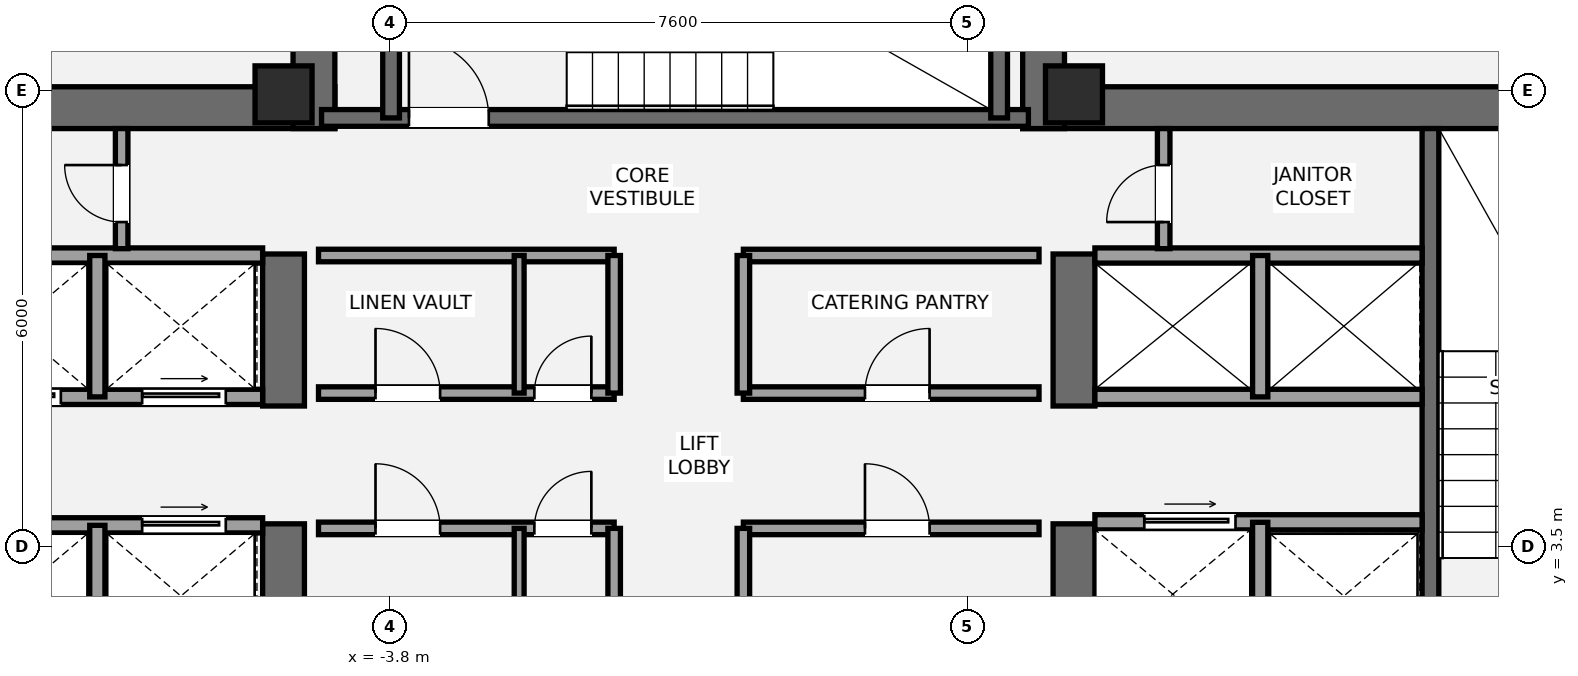
"""IFC4 building model, lengths in metres.
Left out: names, types, materials, properties, quantities, classifications, styles, units other than length and angle.
Written with IfcOpenShell. Run it as: python <this file> out.ifc"""

import sys

from ifc_helpers import new_model, si_unit, direction, frame, frame_2d, origin, origin_2d, place, context, subcontext, project, spatial, rectangle, extrude, element, fill, save


model = new_model("IFC4")
c1 = context("Model", 3, precision=1e-05, world=origin(), true_north=direction((0.0, 1.0)))
c2 = subcontext(c1, "Body", "Model", "MODEL_VIEW")
j1 = project(units=[si_unit("LENGTHUNIT", "METRE"), si_unit("PLANEANGLEUNIT", "RADIAN")], contexts=[c1])
p1 = place(None, origin())
s1 = spatial("IfcSite", under=j1, at=p1, CompositionType="ELEMENT")
p2 = place(p1, origin())
s2 = spatial("IfcBuilding", under=s1, at=p2, CompositionType="ELEMENT")
p3 = place(p2, frame((0.0, 0.0, 210.0)))
s3 = spatial("IfcBuildingStorey", under=s2, at=p3, CompositionType="ELEMENT", Elevation=210.0)
p4 = place(p3, frame((-13.7, 9.275, 0.0), z_axis=(0.0, 0.0, 1.0), x_axis=(1.0, 0.0, 0.0)))
e1 = element("IfcWall", 1, at=p4, inside=s3, PredefinedType="SHEAR", context=c2, shape_type="SweptSolid", body=[
    extrude(rectangle(XDim=9.175, YDim=0.55, at=frame_2d((4.587, 0.0))), origin(), (0.0, 0.0, 1.0), 3.15),
])
p5 = place(p3, frame((-5.2, 1.3, 0.0), z_axis=(0.0, 0.0, 1.0), x_axis=(0.0, 1.0, 0.0)))
e2 = element("IfcWall", 2, at=p5, inside=s3, PredefinedType="SHEAR", context=c2, shape_type="SweptSolid", body=[
    extrude(rectangle(XDim=2.5, YDim=0.55, at=frame_2d((1.25, 0.0))), origin(), (0.0, 0.0, 1.0), 3.15),
])
p6 = place(p3, frame((-5.2, 5.35, 0.0), z_axis=(0.0, 0.0, 1.0), x_axis=(0.0, 1.0, 0.0)))
e3 = element("IfcWall", 3, at=p6, inside=s3, PredefinedType="SHEAR", context=c2, shape_type="SweptSolid", body=[
    extrude(rectangle(XDim=2.0, YDim=0.55, at=frame_2d((1.0, 0.0))), origin(), (0.0, 0.0, 1.0), 3.15),
])
p7 = place(p3, frame((4.525, 9.275, 0.0), z_axis=(0.0, 0.0, 1.0), x_axis=(1.0, 0.0, 0.0)))
e4 = element("IfcWall", 4, at=p7, inside=s3, PredefinedType="SHEAR", context=c2, shape_type="SweptSolid", body=[
    extrude(rectangle(XDim=9.175, YDim=0.55, at=frame_2d((4.587, 0.0))), origin(), (0.0, 0.0, 1.0), 3.15),
])
p8 = place(p3, frame((5.2, 1.3, 0.0), z_axis=(0.0, 0.0, 1.0), x_axis=(0.0, 1.0, 0.0)))
e5 = element("IfcWall", 5, at=p8, inside=s3, PredefinedType="SHEAR", context=c2, shape_type="SweptSolid", body=[
    extrude(rectangle(XDim=2.5, YDim=0.55, at=frame_2d((1.25, 0.0))), origin(), (0.0, 0.0, 1.0), 3.15),
])
p9 = place(p3, frame((5.2, 5.35, 0.0), z_axis=(0.0, 0.0, 1.0), x_axis=(0.0, 1.0, 0.0)))
e6 = element("IfcWall", 6, at=p9, inside=s3, PredefinedType="SHEAR", context=c2, shape_type="SweptSolid", body=[
    extrude(rectangle(XDim=2.0, YDim=0.55, at=frame_2d((1.0, 0.0))), origin(), (0.0, 0.0, 1.0), 3.15),
])
p10 = place(p3, frame((9.89, 1.85, 0.0), z_axis=(0.0, 0.0, 1.0), x_axis=(0.0, 1.0, 0.0)))
e7 = element("IfcWall", 7, at=p10, inside=s3, PredefinedType="SHEAR", context=c2, shape_type="SweptSolid", body=[
    extrude(rectangle(XDim=7.15, YDim=0.22, at=frame_2d((3.575, 0.0))), origin(), (0.0, 0.0, 1.0), 3.15),
])
for number, where, z_axis, x_axis in (
    (8, (-4.8, 9.0, 0.0), (0.0, 0.0, 1.0), (0.0, 1.0, 0.0)),
    (9, (4.8, 9.0, 0.0), (0.0, 0.0, 1.0), (0.0, 1.0, 0.0)),
):
    element("IfcWall", number, at=place(p3, frame(where, z_axis=z_axis, x_axis=x_axis)), inside=s3, PredefinedType="SHEAR", context=c2, shape_type="SweptSolid", body=[
        extrude(rectangle(XDim=3.95, YDim=0.55, at=frame_2d((1.975, 0.0))), origin(), (0.0, 0.0, 1.0), 3.15),
    ])
p11 = place(p3, frame((-4.7, 9.14, 0.0), z_axis=(0.0, 0.0, 1.0), x_axis=(1.0, 0.0, 0.0)))
e10 = element("IfcWall", 10, at=p11, inside=s3, PredefinedType="SHEAR", context=c2, shape_type="SweptSolid", body=[
    extrude(rectangle(XDim=9.3, YDim=0.22, at=frame_2d((4.65, 0.0))), origin(), (0.0, 0.0, 1.0), 3.15),
])
p12 = place(p11, frame((1.15, 0.0, 0.0)))
e11 = element("IfcOpeningElement", 11, at=p12, cuts=e10, PredefinedType="OPENING", context=c2, shape_type="SweptSolid", body=[
    extrude(rectangle(XDim=1.05, YDim=2.15, at=frame_2d((0.525, 1.075))), frame((0.0, 0.12, 0.0), z_axis=(0.0, -1.0, 0.0), x_axis=(1.0, 0.0, 0.0)), (0.0, 0.0, 1.0), 0.24),
])
for number, where, z_axis, x_axis in (
    (12, (-3.785, 9.14, 0.0), (0.0, 0.0, 1.0), (0.0, 1.0, 0.0)),
    (13, (4.215, 9.14, 0.0), (0.0, 0.0, 1.0), (0.0, 1.0, 0.0)),
):
    element("IfcWall", number, at=place(p3, frame(where, z_axis=z_axis, x_axis=x_axis)), inside=s3, PredefinedType="SHEAR", context=c2, shape_type="SweptSolid", body=[
        extrude(rectangle(XDim=3.26, YDim=0.22, at=frame_2d((1.63, 0.0))), origin(), (0.0, 0.0, 1.0), 3.15),
    ])
for number, where, z_axis, x_axis in (
    (14, (-5.2, 9.45, 0.0), (0.0, 0.0, 1.0), (1.0, 0.0, 0.0)),
    (15, (5.2, 9.45, 0.0), (0.0, 0.0, 1.0), (1.0, 0.0, 0.0)),
):
    element("IfcColumn", number, at=place(p3, frame(where, z_axis=z_axis, x_axis=x_axis)), inside=s3, PredefinedType="PILASTER", context=c2, shape_type="SweptSolid", body=[
        extrude(rectangle(XDim=0.75, YDim=0.75, at=origin_2d()), origin(), (0.0, 0.0, 1.0), 3.15),
    ])
p13 = place(p3, frame((-9.78, 3.78, 0.0), z_axis=(0.0, 0.0, 1.0), x_axis=(1.0, 0.0, 0.0)))
e16 = element("IfcWall", 16, at=p13, inside=s3, PredefinedType="SOLIDWALL", context=c2, shape_type="SweptSolid", body=[
    extrude(rectangle(XDim=4.305, YDim=0.2, at=frame_2d((2.152, 0.0))), origin(), (0.0, 0.0, 1.0), 2.97),
])
p14 = place(p13, frame((2.72, 0.0, 0.0)))
e17 = element("IfcOpeningElement", 17, at=p14, cuts=e16, PredefinedType="OPENING", context=c2, shape_type="SweptSolid", body=[
    extrude(rectangle(XDim=1.1, YDim=2.2, at=frame_2d((0.55, 1.1))), frame((0.0, 0.11, 0.0), z_axis=(0.0, -1.0, 0.0), x_axis=(1.0, 0.0, 0.0)), (0.0, 0.0, 1.0), 0.22),
])
p15 = place(p3, frame((-7.65, 1.85, 0.0), z_axis=(0.0, 0.0, 1.0), x_axis=(0.0, 1.0, 0.0)))
e18 = element("IfcWall", 18, at=p15, inside=s3, PredefinedType="SOLIDWALL", context=c2, shape_type="SweptSolid", body=[
    extrude(rectangle(XDim=1.93, YDim=0.2, at=frame_2d((0.965, 0.0))), origin(), (0.0, 0.0, 1.0), 2.97),
])
p16 = place(p3, frame((-9.78, 5.47, 0.0), z_axis=(0.0, 0.0, 1.0), x_axis=(1.0, 0.0, 0.0)))
e19 = element("IfcWall", 19, at=p16, inside=s3, PredefinedType="SOLIDWALL", context=c2, shape_type="SweptSolid", body=[
    extrude(rectangle(XDim=4.305, YDim=0.2, at=frame_2d((2.152, 0.0))), origin(), (0.0, 0.0, 1.0), 2.97),
])
p17 = place(p16, frame((0.55, 0.0, 0.0)))
e20 = element("IfcOpeningElement", 20, at=p17, cuts=e19, PredefinedType="OPENING", context=c2, shape_type="SweptSolid", body=[
    extrude(rectangle(XDim=1.1, YDim=2.2, at=frame_2d((0.55, 1.1))), frame((0.0, 0.11, 0.0), z_axis=(0.0, -1.0, 0.0), x_axis=(1.0, 0.0, 0.0)), (0.0, 0.0, 1.0), 0.22),
])
p18 = place(p16, frame((2.72, 0.0, 0.0)))
e21 = element("IfcOpeningElement", 21, at=p18, cuts=e19, PredefinedType="OPENING", context=c2, shape_type="SweptSolid", body=[
    extrude(rectangle(XDim=1.1, YDim=2.2, at=frame_2d((0.55, 1.1))), frame((0.0, 0.11, 0.0), z_axis=(0.0, -1.0, 0.0), x_axis=(1.0, 0.0, 0.0)), (0.0, 0.0, 1.0), 0.22),
])
p19 = place(p3, frame((-9.78, 7.33, 0.0), z_axis=(0.0, 0.0, 1.0), x_axis=(1.0, 0.0, 0.0)))
e22 = element("IfcWall", 22, at=p19, inside=s3, PredefinedType="SOLIDWALL", context=c2, shape_type="SweptSolid", body=[
    extrude(rectangle(XDim=4.305, YDim=0.2, at=frame_2d((2.152, 0.0))), origin(), (0.0, 0.0, 1.0), 2.97),
])
p20 = place(p3, frame((-7.65, 5.47, 0.0), z_axis=(0.0, 0.0, 1.0), x_axis=(0.0, 1.0, 0.0)))
e23 = element("IfcWall", 23, at=p20, inside=s3, PredefinedType="SOLIDWALL", context=c2, shape_type="SweptSolid", body=[
    extrude(rectangle(XDim=1.86, YDim=0.2, at=frame_2d((0.93, 0.0))), origin(), (0.0, 0.0, 1.0), 2.97),
])
p21 = place(p3, frame((5.475, 3.82, 0.0), z_axis=(0.0, 0.0, 1.0), x_axis=(1.0, 0.0, 0.0)))
e24 = element("IfcWall", 24, at=p21, inside=s3, PredefinedType="SOLIDWALL", context=c2, shape_type="SweptSolid", body=[
    extrude(rectangle(XDim=4.305, YDim=0.2, at=frame_2d((2.152, 0.0))), origin(), (0.0, 0.0, 1.0), 2.97),
])
p22 = place(p21, frame((0.65, 0.0, 0.0)))
e25 = element("IfcOpeningElement", 25, at=p22, cuts=e24, PredefinedType="OPENING", context=c2, shape_type="SweptSolid", body=[
    extrude(rectangle(XDim=1.2, YDim=2.2, at=frame_2d((0.6, 1.1))), frame((0.0, 0.11, 0.0), z_axis=(0.0, -1.0, 0.0), x_axis=(1.0, 0.0, 0.0)), (0.0, 0.0, 1.0), 0.22),
])
p23 = place(p3, frame((7.65, 1.85, 0.0), z_axis=(0.0, 0.0, 1.0), x_axis=(0.0, 1.0, 0.0)))
e26 = element("IfcWall", 26, at=p23, inside=s3, PredefinedType="SOLIDWALL", context=c2, shape_type="SweptSolid", body=[
    extrude(rectangle(XDim=1.97, YDim=0.2, at=frame_2d((0.985, 0.0))), origin(), (0.0, 0.0, 1.0), 2.97),
])
for number, where, z_axis, x_axis in (
    (27, (5.475, 5.47, 0.0), (0.0, 0.0, 1.0), (1.0, 0.0, 0.0)),
    (28, (5.475, 7.33, 0.0), (0.0, 0.0, 1.0), (1.0, 0.0, 0.0)),
):
    element("IfcWall", number, at=place(p3, frame(where, z_axis=z_axis, x_axis=x_axis)), inside=s3, PredefinedType="SOLIDWALL", context=c2, shape_type="SweptSolid", body=[
        extrude(rectangle(XDim=4.305, YDim=0.2, at=frame_2d((2.152, 0.0))), origin(), (0.0, 0.0, 1.0), 2.97),
    ])
p24 = place(p3, frame((7.65, 5.47, 0.0), z_axis=(0.0, 0.0, 1.0), x_axis=(0.0, 1.0, 0.0)))
e29 = element("IfcWall", 29, at=p24, inside=s3, PredefinedType="SOLIDWALL", context=c2, shape_type="SweptSolid", body=[
    extrude(rectangle(XDim=1.86, YDim=0.2, at=frame_2d((0.93, 0.0))), origin(), (0.0, 0.0, 1.0), 2.97),
])
p25 = place(p3, frame((-4.74, 3.74, 0.0), z_axis=(0.0, 0.0, 1.0), x_axis=(1.0, 0.0, 0.0)))
e30 = element("IfcWall", 30, at=p25, inside=s3, PredefinedType="PARTITIONING", context=c2, shape_type="SweptSolid", body=[
    extrude(rectangle(XDim=3.89, YDim=0.165, at=frame_2d((1.945, 0.0))), origin(), (0.0, 0.0, 1.0), 2.97),
])
p26 = place(p25, frame((0.75, 0.0, 0.0)))
e31 = element("IfcOpeningElement", 31, at=p26, cuts=e30, PredefinedType="OPENING", context=c2, shape_type="SweptSolid", body=[
    extrude(rectangle(XDim=0.85, YDim=2.1, at=frame_2d((0.425, 1.05))), frame((0.0, 0.093, 0.0), z_axis=(0.0, -1.0, 0.0), x_axis=(1.0, 0.0, 0.0)), (0.0, 0.0, 1.0), 0.185),
])
p27 = place(p25, frame((2.84, 0.0, 0.0)))
e32 = element("IfcOpeningElement", 32, at=p27, cuts=e30, PredefinedType="OPENING", context=c2, shape_type="SweptSolid", body=[
    extrude(rectangle(XDim=0.75, YDim=2.1, at=frame_2d((0.375, 1.05))), frame((0.0, 0.093, 0.0), z_axis=(0.0, -1.0, 0.0), x_axis=(1.0, 0.0, 0.0)), (0.0, 0.0, 1.0), 0.185),
])
p28 = place(p3, frame((-0.85, 1.92, 0.0), z_axis=(0.0, 0.0, 1.0), x_axis=(0.0, 1.0, 0.0)))
e33 = element("IfcWall", 33, at=p28, inside=s3, PredefinedType="PARTITIONING", context=c2, shape_type="SweptSolid", body=[
    extrude(rectangle(XDim=1.82, YDim=0.165, at=frame_2d((0.91, 0.0))), origin(), (0.0, 0.0, 1.0), 2.97),
])
p29 = place(p3, frame((0.85, 3.74, 0.0), z_axis=(0.0, 0.0, 1.0), x_axis=(1.0, 0.0, 0.0)))
e34 = element("IfcWall", 34, at=p29, inside=s3, PredefinedType="PARTITIONING", context=c2, shape_type="SweptSolid", body=[
    extrude(rectangle(XDim=3.89, YDim=0.165, at=frame_2d((1.945, 0.0))), origin(), (0.0, 0.0, 1.0), 2.97),
])
p30 = place(p29, frame((1.6, 0.0, 0.0)))
e35 = element("IfcOpeningElement", 35, at=p30, cuts=e34, PredefinedType="OPENING", context=c2, shape_type="SweptSolid", body=[
    extrude(rectangle(XDim=0.85, YDim=2.1, at=frame_2d((0.425, 1.05))), frame((0.0, 0.093, 0.0), z_axis=(0.0, -1.0, 0.0), x_axis=(1.0, 0.0, 0.0)), (0.0, 0.0, 1.0), 0.185),
])
p31 = place(p3, frame((0.85, 1.92, 0.0), z_axis=(0.0, 0.0, 1.0), x_axis=(0.0, 1.0, 0.0)))
e36 = element("IfcWall", 36, at=p31, inside=s3, PredefinedType="PARTITIONING", context=c2, shape_type="SweptSolid", body=[
    extrude(rectangle(XDim=1.82, YDim=0.165, at=frame_2d((0.91, 0.0))), origin(), (0.0, 0.0, 1.0), 2.97),
])
p32 = place(p3, frame((-2.1, 1.92, 0.0), z_axis=(0.0, 0.0, 1.0), x_axis=(0.0, 1.0, 0.0)))
e37 = element("IfcWall", 37, at=p32, inside=s3, PredefinedType="PARTITIONING", context=c2, shape_type="SweptSolid", body=[
    extrude(rectangle(XDim=1.82, YDim=0.13, at=frame_2d((0.91, 0.0))), origin(), (0.0, 0.0, 1.0), 2.97),
])
p33 = place(p3, frame((-4.74, 5.52, 0.0), z_axis=(0.0, 0.0, 1.0), x_axis=(1.0, 0.0, 0.0)))
e38 = element("IfcWall", 38, at=p33, inside=s3, PredefinedType="PARTITIONING", context=c2, shape_type="SweptSolid", body=[
    extrude(rectangle(XDim=3.89, YDim=0.165, at=frame_2d((1.945, 0.0))), origin(), (0.0, 0.0, 1.0), 2.97),
])
p34 = place(p33, frame((0.75, 0.0, 0.0)))
e39 = element("IfcOpeningElement", 39, at=p34, cuts=e38, PredefinedType="OPENING", context=c2, shape_type="SweptSolid", body=[
    extrude(rectangle(XDim=0.85, YDim=2.1, at=frame_2d((0.425, 1.05))), frame((0.0, 0.093, 0.0), z_axis=(0.0, -1.0, 0.0), x_axis=(1.0, 0.0, 0.0)), (0.0, 0.0, 1.0), 0.185),
])
p35 = place(p33, frame((2.84, 0.0, 0.0)))
e40 = element("IfcOpeningElement", 40, at=p35, cuts=e38, PredefinedType="OPENING", context=c2, shape_type="SweptSolid", body=[
    extrude(rectangle(XDim=0.75, YDim=2.1, at=frame_2d((0.375, 1.05))), frame((0.0, 0.093, 0.0), z_axis=(0.0, -1.0, 0.0), x_axis=(1.0, 0.0, 0.0)), (0.0, 0.0, 1.0), 0.185),
])
p36 = place(p3, frame((-4.74, 7.33, 0.0), z_axis=(0.0, 0.0, 1.0), x_axis=(1.0, 0.0, 0.0)))
e41 = element("IfcWall", 41, at=p36, inside=s3, PredefinedType="PARTITIONING", context=c2, shape_type="SweptSolid", body=[
    extrude(rectangle(XDim=3.89, YDim=0.165, at=frame_2d((1.945, 0.0))), origin(), (0.0, 0.0, 1.0), 2.97),
])
p37 = place(p3, frame((-0.85, 5.52, 0.0), z_axis=(0.0, 0.0, 1.0), x_axis=(0.0, 1.0, 0.0)))
e42 = element("IfcWall", 42, at=p37, inside=s3, PredefinedType="PARTITIONING", context=c2, shape_type="SweptSolid", body=[
    extrude(rectangle(XDim=1.81, YDim=0.165, at=frame_2d((0.905, 0.0))), origin(), (0.0, 0.0, 1.0), 2.97),
])
p38 = place(p3, frame((0.85, 5.52, 0.0), z_axis=(0.0, 0.0, 1.0), x_axis=(1.0, 0.0, 0.0)))
e43 = element("IfcWall", 43, at=p38, inside=s3, PredefinedType="PARTITIONING", context=c2, shape_type="SweptSolid", body=[
    extrude(rectangle(XDim=3.89, YDim=0.165, at=frame_2d((1.945, 0.0))), origin(), (0.0, 0.0, 1.0), 2.97),
])
p39 = place(p38, frame((1.6, 0.0, 0.0)))
e44 = element("IfcOpeningElement", 44, at=p39, cuts=e43, PredefinedType="OPENING", context=c2, shape_type="SweptSolid", body=[
    extrude(rectangle(XDim=0.85, YDim=2.1, at=frame_2d((0.425, 1.05))), frame((0.0, 0.093, 0.0), z_axis=(0.0, -1.0, 0.0), x_axis=(1.0, 0.0, 0.0)), (0.0, 0.0, 1.0), 0.185),
])
p40 = place(p3, frame((0.85, 7.33, 0.0), z_axis=(0.0, 0.0, 1.0), x_axis=(1.0, 0.0, 0.0)))
e45 = element("IfcWall", 45, at=p40, inside=s3, PredefinedType="PARTITIONING", context=c2, shape_type="SweptSolid", body=[
    extrude(rectangle(XDim=3.89, YDim=0.165, at=frame_2d((1.945, 0.0))), origin(), (0.0, 0.0, 1.0), 2.97),
])
p41 = place(p3, frame((0.85, 5.52, 0.0), z_axis=(0.0, 0.0, 1.0), x_axis=(0.0, 1.0, 0.0)))
e46 = element("IfcWall", 46, at=p41, inside=s3, PredefinedType="PARTITIONING", context=c2, shape_type="SweptSolid", body=[
    extrude(rectangle(XDim=1.81, YDim=0.165, at=frame_2d((0.905, 0.0))), origin(), (0.0, 0.0, 1.0), 2.97),
])
p42 = place(p3, frame((-2.1, 5.52, 0.0), z_axis=(0.0, 0.0, 1.0), x_axis=(0.0, 1.0, 0.0)))
e47 = element("IfcWall", 47, at=p42, inside=s3, PredefinedType="PARTITIONING", context=c2, shape_type="SweptSolid", body=[
    extrude(rectangle(XDim=1.81, YDim=0.13, at=frame_2d((0.905, 0.0))), origin(), (0.0, 0.0, 1.0), 2.97),
])
p43 = place(p3, frame((-7.33, 7.42, 0.0), z_axis=(0.0, 0.0, 1.0), x_axis=(0.0, 1.0, 0.0)))
e48 = element("IfcWall", 48, at=p43, inside=s3, PredefinedType="PARTITIONING", context=c2, shape_type="SweptSolid", body=[
    extrude(rectangle(XDim=1.58, YDim=0.165, at=frame_2d((0.79, 0.0))), origin(), (0.0, 0.0, 1.0), 2.97),
])
p44 = place(p43, frame((0.35, 0.0, 0.0)))
e49 = element("IfcOpeningElement", 49, at=p44, cuts=e48, PredefinedType="OPENING", context=c2, shape_type="SweptSolid", body=[
    extrude(rectangle(XDim=0.75, YDim=2.1, at=frame_2d((0.375, 1.05))), frame((0.0, 0.093, 0.0), z_axis=(0.0, -1.0, 0.0), x_axis=(1.0, 0.0, 0.0)), (0.0, 0.0, 1.0), 0.185),
])
p45 = place(p3, frame((6.38, 7.42, 0.0), z_axis=(0.0, 0.0, 1.0), x_axis=(0.0, 1.0, 0.0)))
e50 = element("IfcWall", 50, at=p45, inside=s3, PredefinedType="PARTITIONING", context=c2, shape_type="SweptSolid", body=[
    extrude(rectangle(XDim=1.58, YDim=0.165, at=frame_2d((0.79, 0.0))), origin(), (0.0, 0.0, 1.0), 2.97),
])
p46 = place(p45, frame((0.35, 0.0, 0.0)))
e51 = element("IfcOpeningElement", 51, at=p46, cuts=e50, PredefinedType="OPENING", context=c2, shape_type="SweptSolid", body=[
    extrude(rectangle(XDim=0.75, YDim=2.1, at=frame_2d((0.375, 1.05))), frame((0.0, 0.093, 0.0), z_axis=(0.0, -1.0, 0.0), x_axis=(1.0, 0.0, 0.0)), (0.0, 0.0, 1.0), 0.185),
])
p47 = place(p12, origin())
e52 = element("IfcDoor", 52, at=p47, inside=s3, OperationType="SINGLE_SWING_LEFT", PredefinedType="DOOR", context=c2, shape_type="SweptSolid", body=[
    extrude(rectangle(XDim=1.05, YDim=2.15, at=frame_2d((0.525, 1.075))), frame((0.0, 0.025, 0.0), z_axis=(0.0, -1.0, 0.0), x_axis=(1.0, 0.0, 0.0)), (0.0, 0.0, 1.0), 0.05),
])
fill(e11, e52)
p48 = place(p17, origin())
e53 = element("IfcDoor", 53, at=p48, inside=s3, OperationType="SLIDING_TO_LEFT", PredefinedType="DOOR", context=c2, shape_type="SweptSolid", body=[
    extrude(rectangle(XDim=1.1, YDim=2.2, at=frame_2d((0.55, 1.1))), frame((0.0, 0.025, 0.0), z_axis=(0.0, -1.0, 0.0), x_axis=(1.0, 0.0, 0.0)), (0.0, 0.0, 1.0), 0.05),
])
fill(e20, e53)
p49 = place(p18, origin())
e54 = element("IfcDoor", 54, at=p49, inside=s3, OperationType="SLIDING_TO_LEFT", PredefinedType="DOOR", context=c2, shape_type="SweptSolid", body=[
    extrude(rectangle(XDim=1.1, YDim=2.2, at=frame_2d((0.55, 1.1))), frame((0.0, 0.025, 0.0), z_axis=(0.0, -1.0, 0.0), x_axis=(1.0, 0.0, 0.0)), (0.0, 0.0, 1.0), 0.05),
])
fill(e21, e54)
p50 = place(p14, origin())
e55 = element("IfcDoor", 55, at=p50, inside=s3, OperationType="SLIDING_TO_LEFT", PredefinedType="DOOR", context=c2, shape_type="SweptSolid", body=[
    extrude(rectangle(XDim=1.1, YDim=2.2, at=frame_2d((0.55, 1.1))), frame((0.0, 0.025, 0.0), z_axis=(0.0, -1.0, 0.0), x_axis=(1.0, 0.0, 0.0)), (0.0, 0.0, 1.0), 0.05),
])
fill(e17, e55)
p51 = place(p22, origin())
e56 = element("IfcDoor", 56, at=p51, inside=s3, OperationType="SLIDING_TO_RIGHT", PredefinedType="DOOR", context=c2, shape_type="SweptSolid", body=[
    extrude(rectangle(XDim=1.2, YDim=2.2, at=frame_2d((0.6, 1.1))), frame((0.0, 0.025, 0.0), z_axis=(0.0, -1.0, 0.0), x_axis=(1.0, 0.0, 0.0)), (0.0, 0.0, 1.0), 0.05),
])
fill(e25, e56)
p52 = place(p26, origin())
e57 = element("IfcDoor", 57, at=p52, inside=s3, OperationType="SINGLE_SWING_LEFT", PredefinedType="DOOR", context=c2, shape_type="SweptSolid", body=[
    extrude(rectangle(XDim=0.85, YDim=2.1, at=frame_2d((0.425, 1.05))), frame((0.0, 0.025, 0.0), z_axis=(0.0, -1.0, 0.0), x_axis=(1.0, 0.0, 0.0)), (0.0, 0.0, 1.0), 0.05),
])
fill(e31, e57)
p53 = place(p27, origin())
e58 = element("IfcDoor", 58, at=p53, inside=s3, OperationType="SINGLE_SWING_RIGHT", PredefinedType="DOOR", context=c2, shape_type="SweptSolid", body=[
    extrude(rectangle(XDim=0.75, YDim=2.1, at=frame_2d((0.375, 1.05))), frame((0.0, 0.025, 0.0), z_axis=(0.0, -1.0, 0.0), x_axis=(1.0, 0.0, 0.0)), (0.0, 0.0, 1.0), 0.05),
])
fill(e32, e58)
p54 = place(p30, origin())
e59 = element("IfcDoor", 59, at=p54, inside=s3, OperationType="SINGLE_SWING_LEFT", PredefinedType="DOOR", context=c2, shape_type="SweptSolid", body=[
    extrude(rectangle(XDim=0.85, YDim=2.1, at=frame_2d((0.425, 1.05))), frame((0.0, 0.025, 0.0), z_axis=(0.0, -1.0, 0.0), x_axis=(1.0, 0.0, 0.0)), (0.0, 0.0, 1.0), 0.05),
])
fill(e35, e59)
p55 = place(p34, origin())
e60 = element("IfcDoor", 60, at=p55, inside=s3, OperationType="SINGLE_SWING_LEFT", PredefinedType="DOOR", context=c2, shape_type="SweptSolid", body=[
    extrude(rectangle(XDim=0.85, YDim=2.1, at=frame_2d((0.425, 1.05))), frame((0.0, 0.025, 0.0), z_axis=(0.0, -1.0, 0.0), x_axis=(1.0, 0.0, 0.0)), (0.0, 0.0, 1.0), 0.05),
])
fill(e39, e60)
p56 = place(p35, origin())
e61 = element("IfcDoor", 61, at=p56, inside=s3, OperationType="SINGLE_SWING_RIGHT", PredefinedType="DOOR", context=c2, shape_type="SweptSolid", body=[
    extrude(rectangle(XDim=0.75, YDim=2.1, at=frame_2d((0.375, 1.05))), frame((0.0, 0.025, 0.0), z_axis=(0.0, -1.0, 0.0), x_axis=(1.0, 0.0, 0.0)), (0.0, 0.0, 1.0), 0.05),
])
fill(e40, e61)
p57 = place(p39, origin())
e62 = element("IfcDoor", 62, at=p57, inside=s3, OperationType="SINGLE_SWING_RIGHT", PredefinedType="DOOR", context=c2, shape_type="SweptSolid", body=[
    extrude(rectangle(XDim=0.85, YDim=2.1, at=frame_2d((0.425, 1.05))), frame((0.0, 0.025, 0.0), z_axis=(0.0, -1.0, 0.0), x_axis=(1.0, 0.0, 0.0)), (0.0, 0.0, 1.0), 0.05),
])
fill(e44, e62)
p58 = place(p44, origin())
e63 = element("IfcDoor", 63, at=p58, inside=s3, OperationType="SINGLE_SWING_RIGHT", PredefinedType="DOOR", context=c2, shape_type="SweptSolid", body=[
    extrude(rectangle(XDim=0.75, YDim=2.1, at=frame_2d((0.375, 1.05))), frame((0.0, 0.025, 0.0), z_axis=(0.0, -1.0, 0.0), x_axis=(1.0, 0.0, 0.0)), (0.0, 0.0, 1.0), 0.05),
])
fill(e49, e63)
p59 = place(p46, origin())
e64 = element("IfcDoor", 64, at=p59, inside=s3, OperationType="SINGLE_SWING_LEFT", PredefinedType="DOOR", context=c2, shape_type="SweptSolid", body=[
    extrude(rectangle(XDim=0.75, YDim=2.1, at=frame_2d((0.375, 1.05))), frame((0.0, 0.025, 0.0), z_axis=(0.0, -1.0, 0.0), x_axis=(1.0, 0.0, 0.0)), (0.0, 0.0, 1.0), 0.05),
])
fill(e51, e64)
save(model, sys.argv[1])
